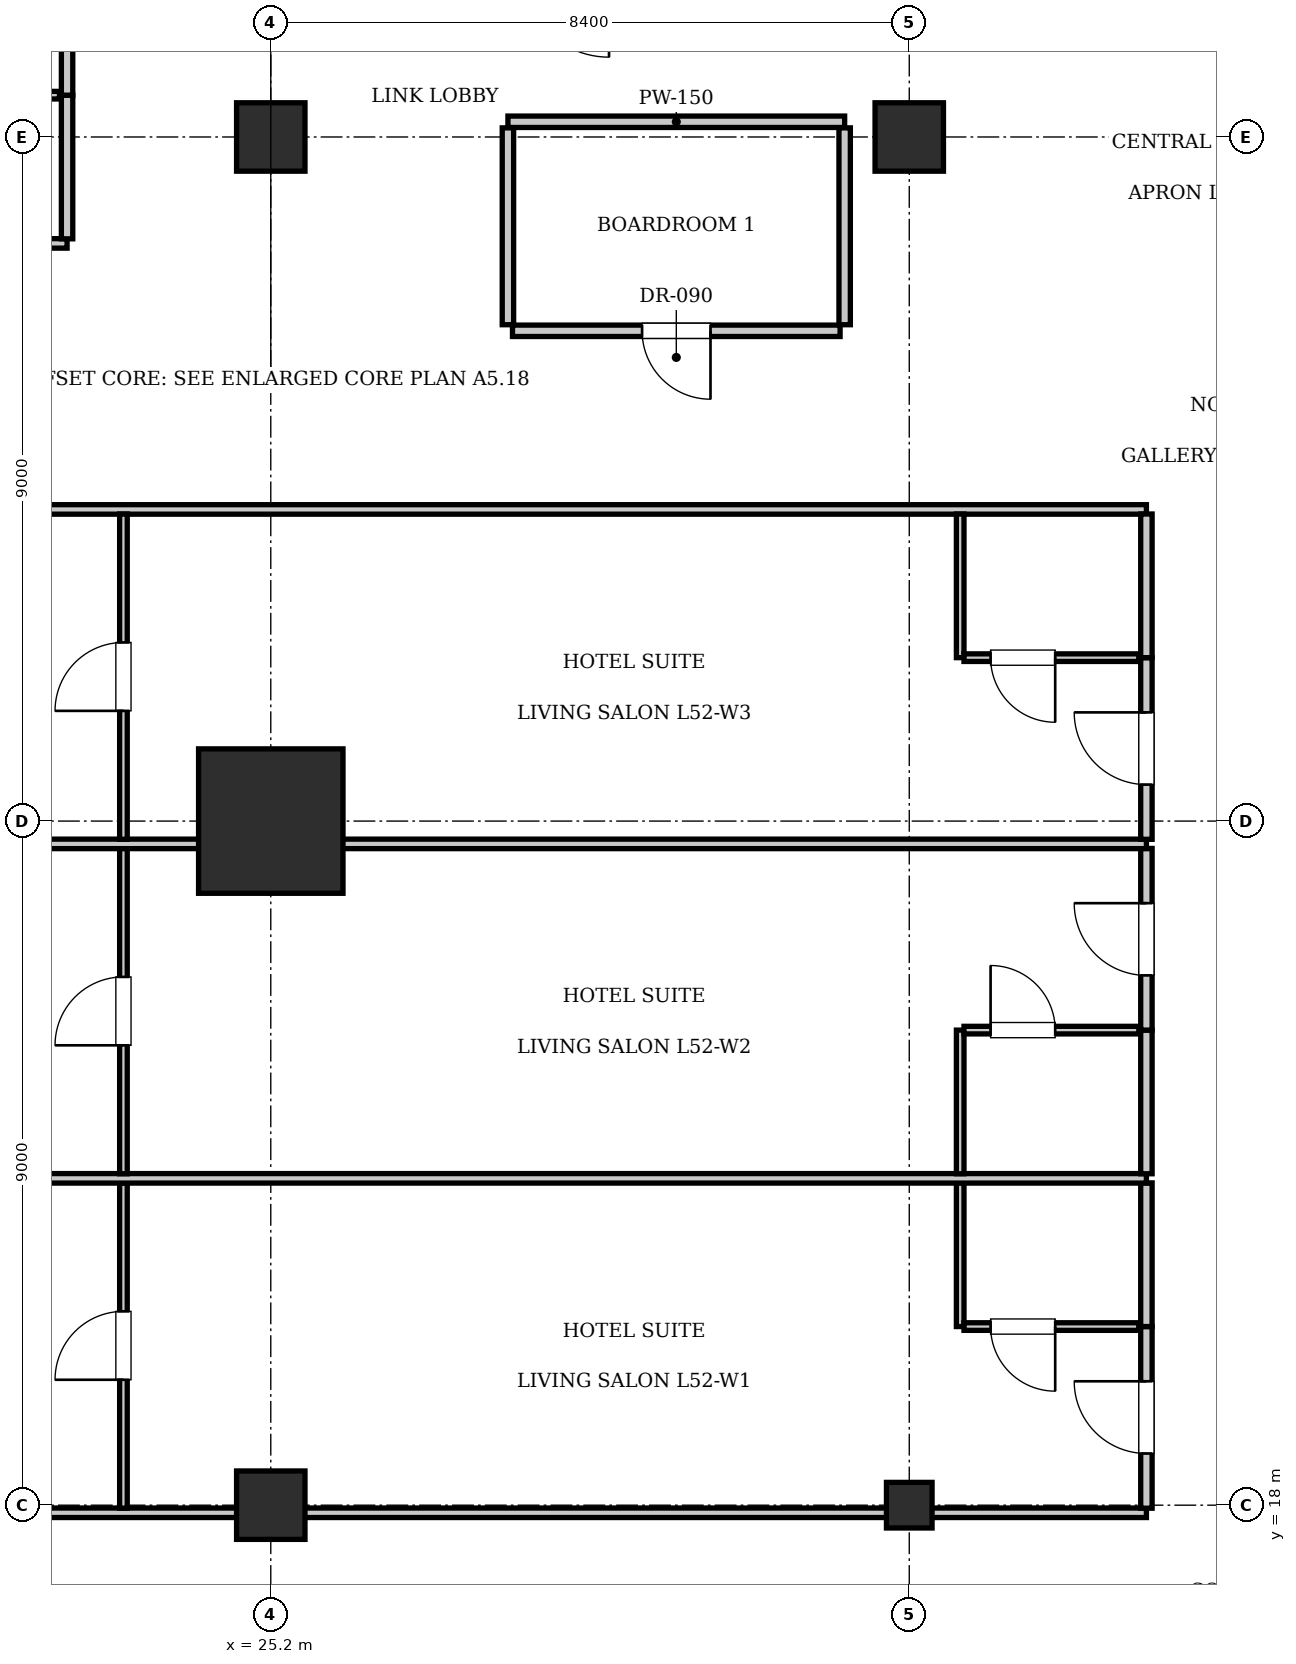
"""IFC4 building model, lengths in metres.
Left out: names, types, materials, properties, quantities, classifications, styles, units other than length and angle.
Written with IfcOpenShell. Run it as: python <this file> out.ifc"""

import sys

from ifc_helpers import new_model, si_unit, direction, frame, frame_2d, origin, origin_2d, place, context, subcontext, project, spatial, rectangle, i_section, extrude, element, fill, save


model = new_model("IFC4")
c1 = context("Model", 3, precision=1e-05, world=origin(), true_north=direction((0.0, 1.0)))
c2 = subcontext(c1, "Body", "Model", "MODEL_VIEW")
j1 = project(units=[si_unit("LENGTHUNIT", "METRE"), si_unit("PLANEANGLEUNIT", "RADIAN")], contexts=[c1])
p1 = place(None, origin())
s1 = spatial("IfcSite", under=j1, at=p1, CompositionType="ELEMENT")
p2 = place(p1, origin())
s2 = spatial("IfcBuilding", under=s1, at=p2, CompositionType="ELEMENT")
p3 = place(p2, frame((0.0, 0.0, 212.1)))
s3 = spatial("IfcBuildingStorey", under=s2, at=p3, CompositionType="ELEMENT", Elevation=212.1)
p4 = place(p3, frame((25.2, 27.0, 0.0), z_axis=(0.0, 0.0, 1.0), x_axis=(1.0, 0.0, 0.0)))
e1 = element("IfcColumn", 1, at=p4, inside=s3, PredefinedType="COLUMN", context=c2, shape_type="SweptSolid", body=[
    extrude(rectangle(XDim=1.9, YDim=1.9, at=origin_2d()), origin(), (0.0, 0.0, 1.0), 3.85),
])
for number, where, z_axis, x_axis in (
    (2, (25.2, 36.0, 0.0), (0.0, 0.0, 1.0), (1.0, 0.0, 0.0)),
    (3, (33.6, 36.0, 0.0), (0.0, 0.0, 1.0), (1.0, 0.0, 0.0)),
    (4, (25.2, 18.0, 0.0), (0.0, 0.0, 1.0), (1.0, 0.0, 0.0)),
):
    element("IfcColumn", number, at=place(p3, frame(where, z_axis=z_axis, x_axis=x_axis)), inside=s3, PredefinedType="COLUMN", context=c2, shape_type="SweptSolid", body=[
        extrude(rectangle(XDim=0.9, YDim=0.9, at=origin_2d()), origin(), (0.0, 0.0, 1.0), 3.85),
    ])
p5 = place(p3, frame((33.6, 18.0, 0.0), z_axis=(0.0, 0.0, 1.0), x_axis=(1.0, 0.0, 0.0)))
e5 = element("IfcColumn", 5, at=p5, inside=s3, PredefinedType="COLUMN", context=c2, shape_type="SweptSolid", body=[
    extrude(i_section(OverallWidth=0.6, OverallDepth=0.6, WebThickness=0.025, FlangeThickness=0.038, at=origin_2d()), origin(), (0.0, 0.0, 1.0), 3.85),
])
p6 = place(p3, frame((28.32, 36.2, 0.0), z_axis=(0.0, 0.0, 1.0), x_axis=(1.0, 0.0, 0.0)))
e6 = element("IfcWall", 6, at=p6, inside=s3, PredefinedType="PARTITIONING", context=c2, shape_type="SweptSolid", body=[
    extrude(rectangle(XDim=4.43, YDim=0.15, at=frame_2d((2.215, 0.0))), origin(), (0.0, 0.0, 1.0), 3.61),
])
for number, where, z_axis, x_axis in (
    (7, (28.32, 33.53, 0.0), (0.0, 0.0, 1.0), (0.0, 1.0, 0.0)),
    (8, (32.75, 33.53, 0.0), (0.0, 0.0, 1.0), (0.0, 1.0, 0.0)),
):
    element("IfcWall", number, at=place(p3, frame(where, z_axis=z_axis, x_axis=x_axis)), inside=s3, PredefinedType="PARTITIONING", context=c2, shape_type="SweptSolid", body=[
        extrude(rectangle(XDim=2.59, YDim=0.15, at=frame_2d((1.295, 0.0))), origin(), (0.0, 0.0, 1.0), 3.61),
    ])
p7 = place(p3, frame((28.38, 33.45, 0.0), z_axis=(0.0, 0.0, 1.0), x_axis=(1.0, 0.0, 0.0)))
e9 = element("IfcWall", 9, at=p7, inside=s3, PredefinedType="PARTITIONING", context=c2, shape_type="SweptSolid", body=[
    extrude(rectangle(XDim=4.31, YDim=0.15, at=frame_2d((2.155, 0.0))), origin(), (0.0, 0.0, 1.0), 3.61),
])
p8 = place(p7, frame((1.705, 0.0, 0.0)))
e10 = element("IfcOpeningElement", 10, at=p8, cuts=e9, PredefinedType="OPENING", context=c2, shape_type="SweptSolid", body=[
    extrude(rectangle(XDim=0.9, YDim=2.1, at=frame_2d((0.45, 1.05))), frame((0.0, 0.085, 0.0), z_axis=(0.0, -1.0, 0.0), x_axis=(1.0, 0.0, 0.0)), (0.0, 0.0, 1.0), 0.17),
])
p9 = place(p3, frame((13.2, 17.9, 0.0), z_axis=(0.0, 0.0, 1.0), x_axis=(1.0, 0.0, 0.0)))
e11 = element("IfcWall", 11, at=p9, inside=s3, PredefinedType="PARTITIONING", context=c2, shape_type="SweptSolid", body=[
    extrude(rectangle(XDim=23.52, YDim=0.125, at=frame_2d((11.76, 0.0))), origin(), (0.0, 0.0, 1.0), 3.071),
])
p10 = place(p3, frame((13.2, 31.1, 0.0), z_axis=(0.0, 0.0, 1.0), x_axis=(1.0, 0.0, 0.0)))
e12 = element("IfcWall", 12, at=p10, inside=s3, PredefinedType="PARTITIONING", context=c2, shape_type="SweptSolid", body=[
    extrude(rectangle(XDim=23.52, YDim=0.125, at=frame_2d((11.76, 0.0))), origin(), (0.0, 0.0, 1.0), 3.61),
])
p11 = place(p3, frame((36.72, 17.96, 0.0), z_axis=(0.0, 0.0, 1.0), x_axis=(0.0, 1.0, 0.0)))
e13 = element("IfcWall", 13, at=p11, inside=s3, PredefinedType="PARTITIONING", context=c2, shape_type="SweptSolid", body=[
    extrude(rectangle(XDim=2.39, YDim=0.15, at=frame_2d((1.195, 0.0))), origin(), (0.0, 0.0, 1.0), 3.61),
])
p12 = place(p11, frame((0.72, 0.0, 0.0)))
e14 = element("IfcOpeningElement", 14, at=p12, cuts=e13, PredefinedType="OPENING", context=c2, shape_type="SweptSolid", body=[
    extrude(rectangle(XDim=0.95, YDim=2.15, at=frame_2d((0.475, 1.075))), frame((0.0, 0.085, 0.0), z_axis=(0.0, -1.0, 0.0), x_axis=(1.0, 0.0, 0.0)), (0.0, 0.0, 1.0), 0.17),
])
p13 = place(p3, frame((36.72, 20.35, 0.0), z_axis=(0.0, 0.0, 1.0), x_axis=(0.0, 1.0, 0.0)))
e15 = element("IfcWall", 15, at=p13, inside=s3, PredefinedType="PARTITIONING", context=c2, shape_type="SweptSolid", body=[
    extrude(rectangle(XDim=1.89, YDim=0.15, at=frame_2d((0.945, 0.0))), origin(), (0.0, 0.0, 1.0), 3.61),
])
p14 = place(p3, frame((34.27, 20.35, 0.0), z_axis=(0.0, 0.0, 1.0), x_axis=(0.0, 1.0, 0.0)))
e16 = element("IfcWall", 16, at=p14, inside=s3, PredefinedType="PARTITIONING", context=c2, shape_type="SweptSolid", body=[
    extrude(rectangle(XDim=1.89, YDim=0.1, at=frame_2d((0.945, 0.0))), origin(), (0.0, 0.0, 1.0), 3.61),
])
p15 = place(p3, frame((34.32, 20.35, 0.0), z_axis=(0.0, 0.0, 1.0), x_axis=(1.0, 0.0, 0.0)))
e17 = element("IfcWall", 17, at=p15, inside=s3, PredefinedType="PARTITIONING", context=c2, shape_type="SweptSolid", body=[
    extrude(rectangle(XDim=2.3, YDim=0.1, at=frame_2d((1.15, 0.0))), origin(), (0.0, 0.0, 1.0), 3.61),
])
p16 = place(p15, frame((0.35, 0.0, 0.0)))
e18 = element("IfcOpeningElement", 18, at=p16, cuts=e17, PredefinedType="OPENING", context=c2, shape_type="SweptSolid", body=[
    extrude(rectangle(XDim=0.85, YDim=2.1, at=frame_2d((0.425, 1.05))), frame((0.0, 0.06, 0.0), z_axis=(0.0, -1.0, 0.0), x_axis=(1.0, 0.0, 0.0)), (0.0, 0.0, 1.0), 0.12),
])
p17 = place(p3, frame((23.262, 17.96, 0.0), z_axis=(0.0, 0.0, 1.0), x_axis=(0.0, 1.0, 0.0)))
e19 = element("IfcWall", 19, at=p17, inside=s3, PredefinedType="PARTITIONING", context=c2, shape_type="SweptSolid", body=[
    extrude(rectangle(XDim=4.28, YDim=0.1, at=frame_2d((2.14, 0.0))), origin(), (0.0, 0.0, 1.0), 3.61),
])
p18 = place(p17, frame((1.69, 0.0, 0.0)))
e20 = element("IfcOpeningElement", 20, at=p18, cuts=e19, PredefinedType="OPENING", context=c2, shape_type="SweptSolid", body=[
    extrude(rectangle(XDim=0.9, YDim=2.1, at=frame_2d((0.45, 1.05))), frame((0.0, 0.06, 0.0), z_axis=(0.0, -1.0, 0.0), x_axis=(1.0, 0.0, 0.0)), (0.0, 0.0, 1.0), 0.12),
])
p19 = place(p3, frame((13.2, 22.3, 0.0), z_axis=(0.0, 0.0, 1.0), x_axis=(1.0, 0.0, 0.0)))
e21 = element("IfcWall", 21, at=p19, inside=s3, PredefinedType="PARTITIONING", context=c2, shape_type="SweptSolid", body=[
    extrude(rectangle(XDim=23.52, YDim=0.125, at=frame_2d((11.76, 0.0))), origin(), (0.0, 0.0, 1.0), 3.61),
])
p20 = place(p3, frame((36.72, 22.36, 0.0), z_axis=(0.0, 0.0, 1.0), x_axis=(0.0, 1.0, 0.0)))
e22 = element("IfcWall", 22, at=p20, inside=s3, PredefinedType="PARTITIONING", context=c2, shape_type="SweptSolid", body=[
    extrude(rectangle(XDim=1.89, YDim=0.15, at=frame_2d((0.945, 0.0))), origin(), (0.0, 0.0, 1.0), 3.61),
])
p21 = place(p3, frame((36.72, 24.25, 0.0), z_axis=(0.0, 0.0, 1.0), x_axis=(0.0, 1.0, 0.0)))
e23 = element("IfcWall", 23, at=p21, inside=s3, PredefinedType="PARTITIONING", context=c2, shape_type="SweptSolid", body=[
    extrude(rectangle(XDim=2.39, YDim=0.15, at=frame_2d((1.195, 0.0))), origin(), (0.0, 0.0, 1.0), 3.61),
])
p22 = place(p21, frame((0.72, 0.0, 0.0)))
e24 = element("IfcOpeningElement", 24, at=p22, cuts=e23, PredefinedType="OPENING", context=c2, shape_type="SweptSolid", body=[
    extrude(rectangle(XDim=0.95, YDim=2.15, at=frame_2d((0.475, 1.075))), frame((0.0, 0.085, 0.0), z_axis=(0.0, -1.0, 0.0), x_axis=(1.0, 0.0, 0.0)), (0.0, 0.0, 1.0), 0.17),
])
p23 = place(p3, frame((34.27, 22.36, 0.0), z_axis=(0.0, 0.0, 1.0), x_axis=(0.0, 1.0, 0.0)))
e25 = element("IfcWall", 25, at=p23, inside=s3, PredefinedType="PARTITIONING", context=c2, shape_type="SweptSolid", body=[
    extrude(rectangle(XDim=1.89, YDim=0.1, at=frame_2d((0.945, 0.0))), origin(), (0.0, 0.0, 1.0), 3.61),
])
p24 = place(p3, frame((34.32, 24.25, 0.0), z_axis=(0.0, 0.0, 1.0), x_axis=(1.0, 0.0, 0.0)))
e26 = element("IfcWall", 26, at=p24, inside=s3, PredefinedType="PARTITIONING", context=c2, shape_type="SweptSolid", body=[
    extrude(rectangle(XDim=2.3, YDim=0.1, at=frame_2d((1.15, 0.0))), origin(), (0.0, 0.0, 1.0), 3.61),
])
p25 = place(p24, frame((0.35, 0.0, 0.0)))
e27 = element("IfcOpeningElement", 27, at=p25, cuts=e26, PredefinedType="OPENING", context=c2, shape_type="SweptSolid", body=[
    extrude(rectangle(XDim=0.85, YDim=2.1, at=frame_2d((0.425, 1.05))), frame((0.0, 0.06, 0.0), z_axis=(0.0, -1.0, 0.0), x_axis=(1.0, 0.0, 0.0)), (0.0, 0.0, 1.0), 0.12),
])
p26 = place(p3, frame((23.262, 22.36, 0.0), z_axis=(0.0, 0.0, 1.0), x_axis=(0.0, 1.0, 0.0)))
e28 = element("IfcWall", 28, at=p26, inside=s3, PredefinedType="PARTITIONING", context=c2, shape_type="SweptSolid", body=[
    extrude(rectangle(XDim=4.28, YDim=0.1, at=frame_2d((2.14, 0.0))), origin(), (0.0, 0.0, 1.0), 3.61),
])
p27 = place(p26, frame((1.69, 0.0, 0.0)))
e29 = element("IfcOpeningElement", 29, at=p27, cuts=e28, PredefinedType="OPENING", context=c2, shape_type="SweptSolid", body=[
    extrude(rectangle(XDim=0.9, YDim=2.1, at=frame_2d((0.45, 1.05))), frame((0.0, 0.06, 0.0), z_axis=(0.0, -1.0, 0.0), x_axis=(1.0, 0.0, 0.0)), (0.0, 0.0, 1.0), 0.12),
])
p28 = place(p3, frame((13.2, 26.7, 0.0), z_axis=(0.0, 0.0, 1.0), x_axis=(1.0, 0.0, 0.0)))
e30 = element("IfcWall", 30, at=p28, inside=s3, PredefinedType="PARTITIONING", context=c2, shape_type="SweptSolid", body=[
    extrude(rectangle(XDim=23.52, YDim=0.125, at=frame_2d((11.76, 0.0))), origin(), (0.0, 0.0, 1.0), 3.61),
])
p29 = place(p3, frame((36.72, 26.76, 0.0), z_axis=(0.0, 0.0, 1.0), x_axis=(0.0, 1.0, 0.0)))
e31 = element("IfcWall", 31, at=p29, inside=s3, PredefinedType="PARTITIONING", context=c2, shape_type="SweptSolid", body=[
    extrude(rectangle(XDim=2.39, YDim=0.15, at=frame_2d((1.195, 0.0))), origin(), (0.0, 0.0, 1.0), 3.61),
])
p30 = place(p29, frame((0.72, 0.0, 0.0)))
e32 = element("IfcOpeningElement", 32, at=p30, cuts=e31, PredefinedType="OPENING", context=c2, shape_type="SweptSolid", body=[
    extrude(rectangle(XDim=0.95, YDim=2.15, at=frame_2d((0.475, 1.075))), frame((0.0, 0.085, 0.0), z_axis=(0.0, -1.0, 0.0), x_axis=(1.0, 0.0, 0.0)), (0.0, 0.0, 1.0), 0.17),
])
p31 = place(p3, frame((36.72, 29.15, 0.0), z_axis=(0.0, 0.0, 1.0), x_axis=(0.0, 1.0, 0.0)))
e33 = element("IfcWall", 33, at=p31, inside=s3, PredefinedType="PARTITIONING", context=c2, shape_type="SweptSolid", body=[
    extrude(rectangle(XDim=1.89, YDim=0.15, at=frame_2d((0.945, 0.0))), origin(), (0.0, 0.0, 1.0), 3.61),
])
p32 = place(p3, frame((34.27, 29.15, 0.0), z_axis=(0.0, 0.0, 1.0), x_axis=(0.0, 1.0, 0.0)))
e34 = element("IfcWall", 34, at=p32, inside=s3, PredefinedType="PARTITIONING", context=c2, shape_type="SweptSolid", body=[
    extrude(rectangle(XDim=1.89, YDim=0.1, at=frame_2d((0.945, 0.0))), origin(), (0.0, 0.0, 1.0), 3.61),
])
p33 = place(p3, frame((34.32, 29.15, 0.0), z_axis=(0.0, 0.0, 1.0), x_axis=(1.0, 0.0, 0.0)))
e35 = element("IfcWall", 35, at=p33, inside=s3, PredefinedType="PARTITIONING", context=c2, shape_type="SweptSolid", body=[
    extrude(rectangle(XDim=2.3, YDim=0.1, at=frame_2d((1.15, 0.0))), origin(), (0.0, 0.0, 1.0), 3.61),
])
p34 = place(p33, frame((0.35, 0.0, 0.0)))
e36 = element("IfcOpeningElement", 36, at=p34, cuts=e35, PredefinedType="OPENING", context=c2, shape_type="SweptSolid", body=[
    extrude(rectangle(XDim=0.85, YDim=2.1, at=frame_2d((0.425, 1.05))), frame((0.0, 0.06, 0.0), z_axis=(0.0, -1.0, 0.0), x_axis=(1.0, 0.0, 0.0)), (0.0, 0.0, 1.0), 0.12),
])
p35 = place(p3, frame((23.262, 26.76, 0.0), z_axis=(0.0, 0.0, 1.0), x_axis=(0.0, 1.0, 0.0)))
e37 = element("IfcWall", 37, at=p35, inside=s3, PredefinedType="PARTITIONING", context=c2, shape_type="SweptSolid", body=[
    extrude(rectangle(XDim=4.28, YDim=0.1, at=frame_2d((2.14, 0.0))), origin(), (0.0, 0.0, 1.0), 3.61),
])
p36 = place(p35, frame((1.69, 0.0, 0.0)))
e38 = element("IfcOpeningElement", 38, at=p36, cuts=e37, PredefinedType="OPENING", context=c2, shape_type="SweptSolid", body=[
    extrude(rectangle(XDim=0.9, YDim=2.1, at=frame_2d((0.45, 1.05))), frame((0.0, 0.06, 0.0), z_axis=(0.0, -1.0, 0.0), x_axis=(1.0, 0.0, 0.0)), (0.0, 0.0, 1.0), 0.12),
])
p37 = place(p3, frame((13.2, 34.6, 0.0), z_axis=(0.0, 0.0, 1.0), x_axis=(1.0, 0.0, 0.0)))
e39 = element("IfcWall", 39, at=p37, inside=s3, PredefinedType="PARTITIONING", context=c2, shape_type="SweptSolid", body=[
    extrude(rectangle(XDim=9.32, YDim=0.125, at=frame_2d((4.66, 0.0))), origin(), (0.0, 0.0, 1.0), 3.61),
])
p38 = place(p3, frame((22.52, 34.66, 0.0), z_axis=(0.0, 0.0, 1.0), x_axis=(0.0, 1.0, 0.0)))
e40 = element("IfcWall", 40, at=p38, inside=s3, PredefinedType="PARTITIONING", context=c2, shape_type="SweptSolid", body=[
    extrude(rectangle(XDim=1.89, YDim=0.15, at=frame_2d((0.945, 0.0))), origin(), (0.0, 0.0, 1.0), 3.61),
])
p39 = place(p3, frame((22.52, 36.55, 0.0), z_axis=(0.0, 0.0, 1.0), x_axis=(0.0, 1.0, 0.0)))
e41 = element("IfcWall", 41, at=p39, inside=s3, PredefinedType="PARTITIONING", context=c2, shape_type="SweptSolid", body=[
    extrude(rectangle(XDim=2.969, YDim=0.15, at=frame_2d((1.485, 0.0))), origin(), (0.0, 0.0, 1.0), 3.61),
])
p40 = place(p39, frame((1.01, 0.0, 0.0)))
e42 = element("IfcOpeningElement", 42, at=p40, cuts=e41, PredefinedType="OPENING", context=c2, shape_type="SweptSolid", body=[
    extrude(rectangle(XDim=0.95, YDim=2.15, at=frame_2d((0.475, 1.075))), frame((0.0, 0.085, 0.0), z_axis=(0.0, -1.0, 0.0), x_axis=(1.0, 0.0, 0.0)), (0.0, 0.0, 1.0), 0.17),
])
p41 = place(p3, frame((20.12, 36.55, 0.0), z_axis=(0.0, 0.0, 1.0), x_axis=(1.0, 0.0, 0.0)))
e43 = element("IfcWall", 43, at=p41, inside=s3, PredefinedType="PARTITIONING", context=c2, shape_type="SweptSolid", body=[
    extrude(rectangle(XDim=2.3, YDim=0.1, at=frame_2d((1.15, 0.0))), origin(), (0.0, 0.0, 1.0), 3.61),
])
p42 = place(p41, frame((0.35, 0.0, 0.0)))
e44 = element("IfcOpeningElement", 44, at=p42, cuts=e43, PredefinedType="OPENING", context=c2, shape_type="SweptSolid", body=[
    extrude(rectangle(XDim=0.85, YDim=2.1, at=frame_2d((0.425, 1.05))), frame((0.0, 0.06, 0.0), z_axis=(0.0, -1.0, 0.0), x_axis=(1.0, 0.0, 0.0)), (0.0, 0.0, 1.0), 0.12),
])
p43 = place(p8, frame((0.9, 0.0, 0.0), z_axis=(0.0, 0.0, 1.0), x_axis=(-1.0, 0.0, 0.0)))
e45 = element("IfcDoor", 45, at=p43, inside=s3, OperationType="SINGLE_SWING_LEFT", PredefinedType="DOOR", context=c2, shape_type="SweptSolid", body=[
    extrude(rectangle(XDim=0.9, YDim=2.1, at=frame_2d((0.45, 1.05))), frame((0.0, 0.025, 0.0), z_axis=(0.0, -1.0, 0.0), x_axis=(1.0, 0.0, 0.0)), (0.0, 0.0, 1.0), 0.05),
])
fill(e10, e45)
p44 = place(p16, frame((0.85, 0.0, 0.0), z_axis=(0.0, 0.0, 1.0), x_axis=(-1.0, 0.0, 0.0)))
e46 = element("IfcDoor", 46, at=p44, inside=s3, OperationType="SINGLE_SWING_LEFT", PredefinedType="DOOR", context=c2, shape_type="SweptSolid", body=[
    extrude(rectangle(XDim=0.85, YDim=2.1, at=frame_2d((0.425, 1.05))), frame((0.0, 0.025, 0.0), z_axis=(0.0, -1.0, 0.0), x_axis=(1.0, 0.0, 0.0)), (0.0, 0.0, 1.0), 0.05),
])
fill(e18, e46)
p45 = place(p12, origin())
e47 = element("IfcDoor", 47, at=p45, inside=s3, OperationType="SINGLE_SWING_RIGHT", PredefinedType="DOOR", context=c2, shape_type="SweptSolid", body=[
    extrude(rectangle(XDim=0.95, YDim=2.15, at=frame_2d((0.475, 1.075))), frame((0.0, 0.025, 0.0), z_axis=(0.0, -1.0, 0.0), x_axis=(1.0, 0.0, 0.0)), (0.0, 0.0, 1.0), 0.05),
])
fill(e14, e47)
p46 = place(p18, origin())
e48 = element("IfcDoor", 48, at=p46, inside=s3, OperationType="SINGLE_SWING_LEFT", PredefinedType="DOOR", context=c2, shape_type="SweptSolid", body=[
    extrude(rectangle(XDim=0.9, YDim=2.1, at=frame_2d((0.45, 1.05))), frame((0.0, 0.025, 0.0), z_axis=(0.0, -1.0, 0.0), x_axis=(1.0, 0.0, 0.0)), (0.0, 0.0, 1.0), 0.05),
])
fill(e20, e48)
p47 = place(p25, origin())
e49 = element("IfcDoor", 49, at=p47, inside=s3, OperationType="SINGLE_SWING_LEFT", PredefinedType="DOOR", context=c2, shape_type="SweptSolid", body=[
    extrude(rectangle(XDim=0.85, YDim=2.1, at=frame_2d((0.425, 1.05))), frame((0.0, 0.025, 0.0), z_axis=(0.0, -1.0, 0.0), x_axis=(1.0, 0.0, 0.0)), (0.0, 0.0, 1.0), 0.05),
])
fill(e27, e49)
p48 = place(p22, origin())
e50 = element("IfcDoor", 50, at=p48, inside=s3, OperationType="SINGLE_SWING_RIGHT", PredefinedType="DOOR", context=c2, shape_type="SweptSolid", body=[
    extrude(rectangle(XDim=0.95, YDim=2.15, at=frame_2d((0.475, 1.075))), frame((0.0, 0.025, 0.0), z_axis=(0.0, -1.0, 0.0), x_axis=(1.0, 0.0, 0.0)), (0.0, 0.0, 1.0), 0.05),
])
fill(e24, e50)
p49 = place(p27, origin())
e51 = element("IfcDoor", 51, at=p49, inside=s3, OperationType="SINGLE_SWING_LEFT", PredefinedType="DOOR", context=c2, shape_type="SweptSolid", body=[
    extrude(rectangle(XDim=0.9, YDim=2.1, at=frame_2d((0.45, 1.05))), frame((0.0, 0.025, 0.0), z_axis=(0.0, -1.0, 0.0), x_axis=(1.0, 0.0, 0.0)), (0.0, 0.0, 1.0), 0.05),
])
fill(e29, e51)
p50 = place(p34, frame((0.85, 0.0, 0.0), z_axis=(0.0, 0.0, 1.0), x_axis=(-1.0, 0.0, 0.0)))
e52 = element("IfcDoor", 52, at=p50, inside=s3, OperationType="SINGLE_SWING_LEFT", PredefinedType="DOOR", context=c2, shape_type="SweptSolid", body=[
    extrude(rectangle(XDim=0.85, YDim=2.1, at=frame_2d((0.425, 1.05))), frame((0.0, 0.025, 0.0), z_axis=(0.0, -1.0, 0.0), x_axis=(1.0, 0.0, 0.0)), (0.0, 0.0, 1.0), 0.05),
])
fill(e36, e52)
p51 = place(p30, origin())
e53 = element("IfcDoor", 53, at=p51, inside=s3, OperationType="SINGLE_SWING_RIGHT", PredefinedType="DOOR", context=c2, shape_type="SweptSolid", body=[
    extrude(rectangle(XDim=0.95, YDim=2.15, at=frame_2d((0.475, 1.075))), frame((0.0, 0.025, 0.0), z_axis=(0.0, -1.0, 0.0), x_axis=(1.0, 0.0, 0.0)), (0.0, 0.0, 1.0), 0.05),
])
fill(e32, e53)
p52 = place(p36, origin())
e54 = element("IfcDoor", 54, at=p52, inside=s3, OperationType="SINGLE_SWING_LEFT", PredefinedType="DOOR", context=c2, shape_type="SweptSolid", body=[
    extrude(rectangle(XDim=0.9, YDim=2.1, at=frame_2d((0.45, 1.05))), frame((0.0, 0.025, 0.0), z_axis=(0.0, -1.0, 0.0), x_axis=(1.0, 0.0, 0.0)), (0.0, 0.0, 1.0), 0.05),
])
fill(e38, e54)
save(model, sys.argv[1])
